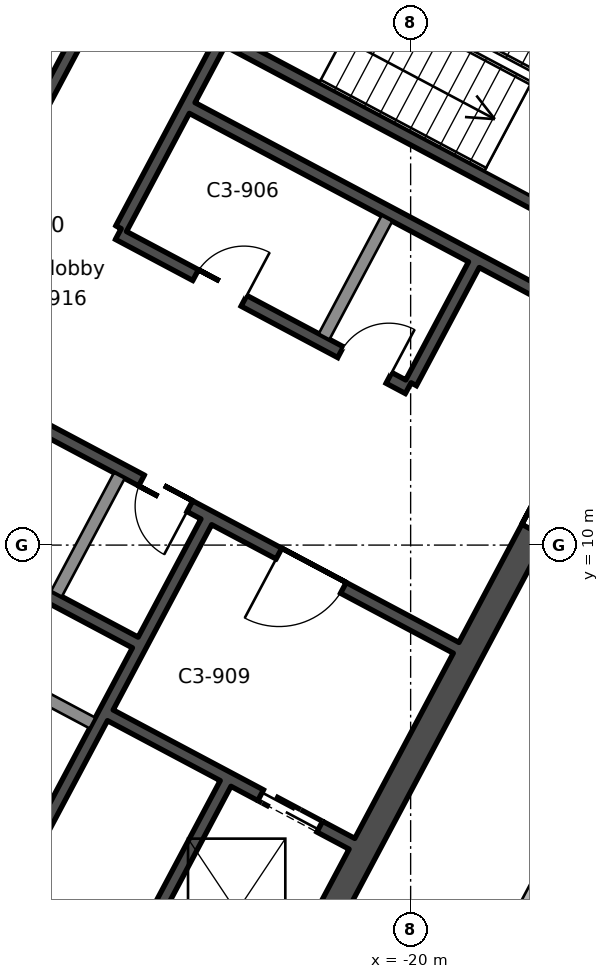
"""IFC4 building model, lengths in metres.
Left out: names, types, materials, properties, quantities, classifications, styles, units other than length and angle.
Written with IfcOpenShell. Run it as: python <this file> out.ifc"""

import sys

from ifc_helpers import new_model, si_unit, direction, frame, frame_2d, origin, place, context, subcontext, project, spatial, rectangle, extrude, element, fill, save


model = new_model("IFC4")
c1 = context("Model", 3, precision=1e-05, world=origin(), true_north=direction((0.0, 1.0)))
c2 = subcontext(c1, "Body", "Model", "MODEL_VIEW")
j1 = project(units=[si_unit("LENGTHUNIT", "METRE"), si_unit("PLANEANGLEUNIT", "RADIAN")], contexts=[c1])
p1 = place(None, origin())
s1 = spatial("IfcSite", under=j1, at=p1, CompositionType="ELEMENT")
p2 = place(p1, origin())
s2 = spatial("IfcBuilding", under=s1, at=p2, CompositionType="ELEMENT")
p3 = place(p2, frame((0.0, 0.0, 336.6)))
s3 = spatial("IfcBuildingStorey", under=s2, at=p3, CompositionType="ELEMENT", Elevation=336.6)
p4 = place(p3, frame((-13.771, 18.138, 0.0), z_axis=(0.0, 0.0, 1.0), x_axis=(-0.469467968382, -0.882949504028, 0.0)))
e1 = element("IfcWall", 1, at=p4, inside=s3, PredefinedType="SHEAR", context=c2, shape_type="SweptSolid", body=[
    extrude(rectangle(XDim=19.1, YDim=0.45, at=frame_2d((9.55, 0.0))), origin(), (0.0, 0.0, 1.0), 4.2),
])
p5 = place(p4, frame((6.55, 0.0, 0.0)))
e2 = element("IfcOpeningElement", 2, at=p5, cuts=e1, PredefinedType="OPENING", context=c2, shape_type="SweptSolid", body=[
    extrude(rectangle(XDim=2.4, YDim=2.4, at=frame_2d((1.2, 1.2))), frame((0.0, 0.235, 0.0), z_axis=(0.0, -1.0, 0.0), x_axis=(1.0, 0.0, 0.0)), (0.0, 0.0, 1.0), 0.47),
])
p6 = place(p3, frame((-14.076, 18.045, 0.0), z_axis=(0.0, 0.0, 1.0), x_axis=(-0.882947755831, 0.46947125628, 0.0)))
e3 = element("IfcWall", 3, at=p6, inside=s3, PredefinedType="SHEAR", context=c2, shape_type="SweptSolid", body=[
    extrude(rectangle(XDim=20.2, YDim=0.45, at=frame_2d((10.1, 0.0))), origin(), (0.0, 0.0, 1.0), 4.2),
])
p7 = place(p3, frame((-22.832, 1.578, 0.0), z_axis=(0.0, 0.0, 1.0), x_axis=(-0.88294509198, 0.469476266226, 0.0)))
e4 = element("IfcWall", 4, at=p7, inside=s3, PredefinedType="SHEAR", context=c2, shape_type="SweptSolid", body=[
    extrude(rectangle(XDim=20.2, YDim=0.45, at=frame_2d((10.1, 0.0))), origin(), (0.0, 0.0, 1.0), 4.2),
])
p8 = place(p3, frame((-23.043, 6.08, 0.0), z_axis=(0.0, 0.0, 1.0), x_axis=(-0.469494272526, -0.882935517501, 0.0)))
e5 = element("IfcWall", 5, at=p8, inside=s3, PredefinedType="SHEAR", context=c2, shape_type="SweptSolid", body=[
    extrude(rectangle(XDim=3.65, YDim=0.2, at=frame_2d((1.825, 0.0))), origin(), (0.0, 0.0, 1.0), 4.2),
])
p9 = place(p3, frame((-18.96, 14.611, 0.0), z_axis=(0.0, 0.0, 1.0), x_axis=(-0.4694473164, -0.882960484464, 0.0)))
e6 = element("IfcWall", 6, at=p9, inside=s3, PredefinedType="SHEAR", context=c2, shape_type="SweptSolid", body=[
    extrude(rectangle(XDim=2.2, YDim=0.2, at=frame_2d((1.1, 0.0))), origin(), (0.0, 0.0, 1.0), 4.2),
])
p10 = place(p3, frame((-20.39, 15.372, 0.0), z_axis=(0.0, 0.0, 1.0), x_axis=(-0.4694473164, -0.882960484464, 0.0)))
e7 = element("IfcWall", 7, at=p10, inside=s3, PredefinedType="SOLIDWALL", context=c2, shape_type="SweptSolid", body=[
    extrude(rectangle(XDim=2.2, YDim=0.2, at=frame_2d((1.1, 0.0))), origin(), (0.0, 0.0, 1.0), 4.2),
])
p11 = place(p3, frame((-23.36, 10.382, 0.0), z_axis=(0.0, 0.0, 1.0), x_axis=(-0.469480409012, -0.88294288918, 0.0)))
e8 = element("IfcWall", 8, at=p11, inside=s3, PredefinedType="SHEAR", context=c2, shape_type="SweptSolid", body=[
    extrude(rectangle(XDim=7.3, YDim=0.2, at=frame_2d((3.65, 0.0))), origin(), (0.0, 0.0, 1.0), 4.2),
])
p12 = place(p3, frame((-24.791, 11.143, 0.0), z_axis=(0.0, 0.0, 1.0), x_axis=(-0.469487830541, -0.882938942948, 0.0)))
e9 = element("IfcWall", 9, at=p12, inside=s3, PredefinedType="SOLIDWALL", context=c2, shape_type="SweptSolid", body=[
    extrude(rectangle(XDim=2.2, YDim=0.2, at=frame_2d((1.1, 0.0))), origin(), (0.0, 0.0, 1.0), 4.2),
])
p13 = place(p3, frame((-21.333, 21.649, 0.0), z_axis=(0.0, 0.0, 1.0), x_axis=(-0.469494272526, -0.882935517501, 0.0)))
e10 = element("IfcWall", 10, at=p13, inside=s3, PredefinedType="SHEAR", context=c2, shape_type="SweptSolid", body=[
    extrude(rectangle(XDim=7.3, YDim=0.2, at=frame_2d((3.65, 0.0))), origin(), (0.0, 0.0, 1.0), 4.2),
])
p14 = place(p13, frame((1.3, 0.0, 0.0)))
e11 = element("IfcOpeningElement", 11, at=p14, cuts=e10, PredefinedType="OPENING", context=c2, shape_type="SweptSolid", body=[
    extrude(rectangle(XDim=1.2, YDim=2.1, at=frame_2d((0.6, 1.05))), frame((0.0, 0.11, 0.0), z_axis=(0.0, -1.0, 0.0), x_axis=(1.0, 0.0, 0.0)), (0.0, 0.0, 1.0), 0.22),
])
p15 = place(p3, frame((-23.188, 22.635, 0.0), z_axis=(0.0, 0.0, 1.0), x_axis=(-0.469454336211, -0.882956752176, 0.0)))
e12 = element("IfcWall", 12, at=p15, inside=s3, PredefinedType="SHEAR", context=c2, shape_type="SweptSolid", body=[
    extrude(rectangle(XDim=7.3, YDim=0.2, at=frame_2d((3.65, 0.0))), origin(), (0.0, 0.0, 1.0), 4.2),
])
p16 = place(p15, frame((0.8, 0.0, 0.0)))
e13 = element("IfcOpeningElement", 13, at=p16, cuts=e12, PredefinedType="OPENING", context=c2, shape_type="SweptSolid", body=[
    extrude(rectangle(XDim=0.9, YDim=2.1, at=frame_2d((0.45, 1.05))), frame((0.0, 0.11, 0.0), z_axis=(0.0, -1.0, 0.0), x_axis=(1.0, 0.0, 0.0)), (0.0, 0.0, 1.0), 0.22),
])
p17 = place(p15, frame((3.3, 0.0, 0.0)))
e14 = element("IfcOpeningElement", 14, at=p17, cuts=e12, PredefinedType="OPENING", context=c2, shape_type="SweptSolid", body=[
    extrude(rectangle(XDim=0.9, YDim=2.1, at=frame_2d((0.45, 1.05))), frame((0.0, 0.11, 0.0), z_axis=(0.0, -1.0, 0.0), x_axis=(1.0, 0.0, 0.0)), (0.0, 0.0, 1.0), 0.22),
])
p18 = place(p3, frame((-15.942, 14.536, 0.0), z_axis=(0.0, 0.0, 1.0), x_axis=(-0.882946947542, 0.469472776449, 0.0)))
e15 = element("IfcWall", 15, at=p18, inside=s3, PredefinedType="SHEAR", context=c2, shape_type="SweptSolid", body=[
    extrude(rectangle(XDim=8.0, YDim=0.2, at=frame_2d((4.0, 0.0))), origin(), (0.0, 0.0, 1.0), 4.2),
])
p19 = place(p3, frame((-16.529, 13.432, 0.0), z_axis=(0.0, 0.0, 1.0), x_axis=(-0.88295287151, 0.469461634952, 0.0)))
e16 = element("IfcWall", 16, at=p19, inside=s3, PredefinedType="SHEAR", context=c2, shape_type="SweptSolid", body=[
    extrude(rectangle(XDim=8.0, YDim=0.2, at=frame_2d((4.0, 0.0))), origin(), (0.0, 0.0, 1.0), 4.2),
])
p20 = place(p3, frame((-20.04, 12.581, 0.0), z_axis=(0.0, 0.0, 1.0), x_axis=(-0.882942972946, 0.469480251476, 0.0)))
e17 = element("IfcWall", 17, at=p20, inside=s3, PredefinedType="SHEAR", context=c2, shape_type="SweptSolid", body=[
    extrude(rectangle(XDim=5.4, YDim=0.2, at=frame_2d((2.7, 0.0))), origin(), (0.0, 0.0, 1.0), 4.2),
])
p21 = place(p20, frame((0.36, 0.0, 0.0)))
e18 = element("IfcOpeningElement", 18, at=p21, cuts=e17, PredefinedType="OPENING", context=c2, shape_type="SweptSolid", body=[
    extrude(rectangle(XDim=0.9, YDim=2.1, at=frame_2d((0.45, 1.05))), frame((0.0, 0.11, 0.0), z_axis=(0.0, -1.0, 0.0), x_axis=(1.0, 0.0, 0.0)), (0.0, 0.0, 1.0), 0.22),
])
p22 = place(p20, frame((3.06, 0.0, 0.0)))
e19 = element("IfcOpeningElement", 19, at=p22, cuts=e17, PredefinedType="OPENING", context=c2, shape_type="SweptSolid", body=[
    extrude(rectangle(XDim=0.9, YDim=2.1, at=frame_2d((0.45, 1.05))), frame((0.0, 0.11, 0.0), z_axis=(0.0, -1.0, 0.0), x_axis=(1.0, 0.0, 0.0)), (0.0, 0.0, 1.0), 0.22),
])
p23 = place(p3, frame((-19.252, 8.311, 0.0), z_axis=(0.0, 0.0, 1.0), x_axis=(-0.882955722218, 0.469456273365, 0.0)))
e20 = element("IfcWall", 20, at=p23, inside=s3, PredefinedType="SHEAR", context=c2, shape_type="SweptSolid", body=[
    extrude(rectangle(XDim=10.0, YDim=0.2, at=frame_2d((5.0, 0.0))), origin(), (0.0, 0.0, 1.0), 4.2),
])
p24 = place(p23, frame((2.1, 0.0, 0.0)))
e21 = element("IfcOpeningElement", 21, at=p24, cuts=e20, PredefinedType="OPENING", context=c2, shape_type="SweptSolid", body=[
    extrude(rectangle(XDim=1.2, YDim=2.1, at=frame_2d((0.6, 1.05))), frame((0.0, 0.11, 0.0), z_axis=(0.0, -1.0, 0.0), x_axis=(1.0, 0.0, 0.0)), (0.0, 0.0, 1.0), 0.22),
])
p25 = place(p23, frame((4.96, 0.0, 0.0)))
e22 = element("IfcOpeningElement", 22, at=p25, cuts=e20, PredefinedType="OPENING", context=c2, shape_type="SweptSolid", body=[
    extrude(rectangle(XDim=0.9, YDim=2.1, at=frame_2d((0.45, 1.05))), frame((0.0, 0.11, 0.0), z_axis=(0.0, -1.0, 0.0), x_axis=(1.0, 0.0, 0.0)), (0.0, 0.0, 1.0), 0.22),
])
p26 = place(p23, frame((7.66, 0.0, 0.0)))
e23 = element("IfcOpeningElement", 23, at=p26, cuts=e20, PredefinedType="OPENING", context=c2, shape_type="SweptSolid", body=[
    extrude(rectangle(XDim=0.9, YDim=2.1, at=frame_2d((0.45, 1.05))), frame((0.0, 0.11, 0.0), z_axis=(0.0, -1.0, 0.0), x_axis=(1.0, 0.0, 0.0)), (0.0, 0.0, 1.0), 0.22),
])
p27 = place(p3, frame((-24.528, 8.398, 0.0), z_axis=(0.0, 0.0, 1.0), x_axis=(-0.882953967957, 0.469459572775, 0.0)))
e24 = element("IfcWall", 24, at=p27, inside=s3, PredefinedType="SHEAR", context=c2, shape_type="SweptSolid", body=[
    extrude(rectangle(XDim=5.2, YDim=0.2, at=frame_2d((2.6, 0.0))), origin(), (0.0, 0.0, 1.0), 4.2),
])
p28 = place(p3, frame((-20.965, 5.088, 0.0), z_axis=(0.0, 0.0, 1.0), x_axis=(-0.882925986334, 0.469512196493, 0.0)))
e25 = element("IfcWall", 25, at=p28, inside=s3, PredefinedType="SHEAR", context=c2, shape_type="SweptSolid", body=[
    extrude(rectangle(XDim=4.5, YDim=0.2, at=frame_2d((2.25, 0.0))), origin(), (0.0, 0.0, 1.0), 4.2),
])
p29 = place(p28, frame((0.6, 0.0, 0.0)))
e26 = element("IfcOpeningElement", 26, at=p29, cuts=e25, PredefinedType="OPENING", context=c2, shape_type="SweptSolid", body=[
    extrude(rectangle(XDim=1.1, YDim=2.1, at=frame_2d((0.55, 1.05))), frame((0.0, 0.11, 0.0), z_axis=(0.0, -1.0, 0.0), x_axis=(1.0, 0.0, 0.0)), (0.0, 0.0, 1.0), 0.22),
])
p30 = place(p3, frame((-25.232, 7.074, 0.0), z_axis=(0.0, 0.0, 1.0), x_axis=(-0.882953967957, 0.469459572775, 0.0)))
e27 = element("IfcWall", 27, at=p30, inside=s3, PredefinedType="SOLIDWALL", context=c2, shape_type="SweptSolid", body=[
    extrude(rectangle(XDim=5.2, YDim=0.2, at=frame_2d((2.6, 0.0))), origin(), (0.0, 0.0, 1.0), 4.2),
])
p31 = place(p3, frame((-10.218, 18.911, 0.0), z_axis=(0.0, 0.0, 1.0), x_axis=(-0.469468702847, -0.882949113509, 0.0)))
e28 = element("IfcWall", 28, at=p31, inside=s3, PredefinedType="PARTITIONING", context=c2, shape_type="SweptSolid", body=[
    extrude(rectangle(XDim=23.8, YDim=0.2, at=frame_2d((11.9, 0.0))), origin(), (0.0, 0.0, 1.0), 3.8),
])
p32 = place(p31, frame((11.4, 0.0, 0.0)))
e29 = element("IfcOpeningElement", 29, at=p32, cuts=e28, PredefinedType="OPENING", context=c2, shape_type="SweptSolid", body=[
    extrude(rectangle(XDim=1.0, YDim=2.1, at=frame_2d((0.5, 1.05))), frame((0.0, 0.11, 0.0), z_axis=(0.0, -1.0, 0.0), x_axis=(1.0, 0.0, 0.0)), (0.0, 0.0, 1.0), 0.22),
])
p33 = place(p24, origin())
e30 = element("IfcDoor", 30, at=p33, inside=s3, OperationType="SINGLE_SWING_RIGHT", PredefinedType="DOOR", context=c2, shape_type="SweptSolid", body=[
    extrude(rectangle(XDim=1.2, YDim=2.1, at=frame_2d((0.6, 1.05))), frame((0.0, 0.025, 0.0), z_axis=(0.0, -1.0, 0.0), x_axis=(1.0, 0.0, 0.0)), (0.0, 0.0, 1.0), 0.05),
])
fill(e21, e30)
p34 = place(p25, origin())
e31 = element("IfcDoor", 31, at=p34, inside=s3, OperationType="SINGLE_SWING_LEFT", PredefinedType="DOOR", context=c2, shape_type="SweptSolid", body=[
    extrude(rectangle(XDim=0.9, YDim=2.1, at=frame_2d((0.45, 1.05))), frame((0.0, 0.025, 0.0), z_axis=(0.0, -1.0, 0.0), x_axis=(1.0, 0.0, 0.0)), (0.0, 0.0, 1.0), 0.05),
])
fill(e22, e31)
p35 = place(p21, frame((0.9, 0.0, 0.0), z_axis=(0.0, 0.0, 1.0), x_axis=(-1.0, 0.0, 0.0)))
e32 = element("IfcDoor", 32, at=p35, inside=s3, OperationType="SINGLE_SWING_RIGHT", PredefinedType="DOOR", context=c2, shape_type="SweptSolid", body=[
    extrude(rectangle(XDim=0.9, YDim=2.1, at=frame_2d((0.45, 1.05))), frame((0.0, 0.025, 0.0), z_axis=(0.0, -1.0, 0.0), x_axis=(1.0, 0.0, 0.0)), (0.0, 0.0, 1.0), 0.05),
])
fill(e18, e32)
p36 = place(p22, frame((0.9, 0.0, 0.0), z_axis=(0.0, 0.0, 1.0), x_axis=(-1.0, 0.0, 0.0)))
e33 = element("IfcDoor", 33, at=p36, inside=s3, OperationType="SINGLE_SWING_RIGHT", PredefinedType="DOOR", context=c2, shape_type="SweptSolid", body=[
    extrude(rectangle(XDim=0.9, YDim=2.1, at=frame_2d((0.45, 1.05))), frame((0.0, 0.025, 0.0), z_axis=(0.0, -1.0, 0.0), x_axis=(1.0, 0.0, 0.0)), (0.0, 0.0, 1.0), 0.05),
])
fill(e19, e33)
p37 = place(p29, origin())
e34 = element("IfcDoor", 34, at=p37, inside=s3, OperationType="DOUBLE_DOOR_SLIDING", PredefinedType="DOOR", context=c2, shape_type="SweptSolid", body=[
    extrude(rectangle(XDim=1.1, YDim=2.1, at=frame_2d((0.55, 1.05))), frame((0.0, 0.025, 0.0), z_axis=(0.0, -1.0, 0.0), x_axis=(1.0, 0.0, 0.0)), (0.0, 0.0, 1.0), 0.05),
])
fill(e26, e34)
save(model, sys.argv[1])
